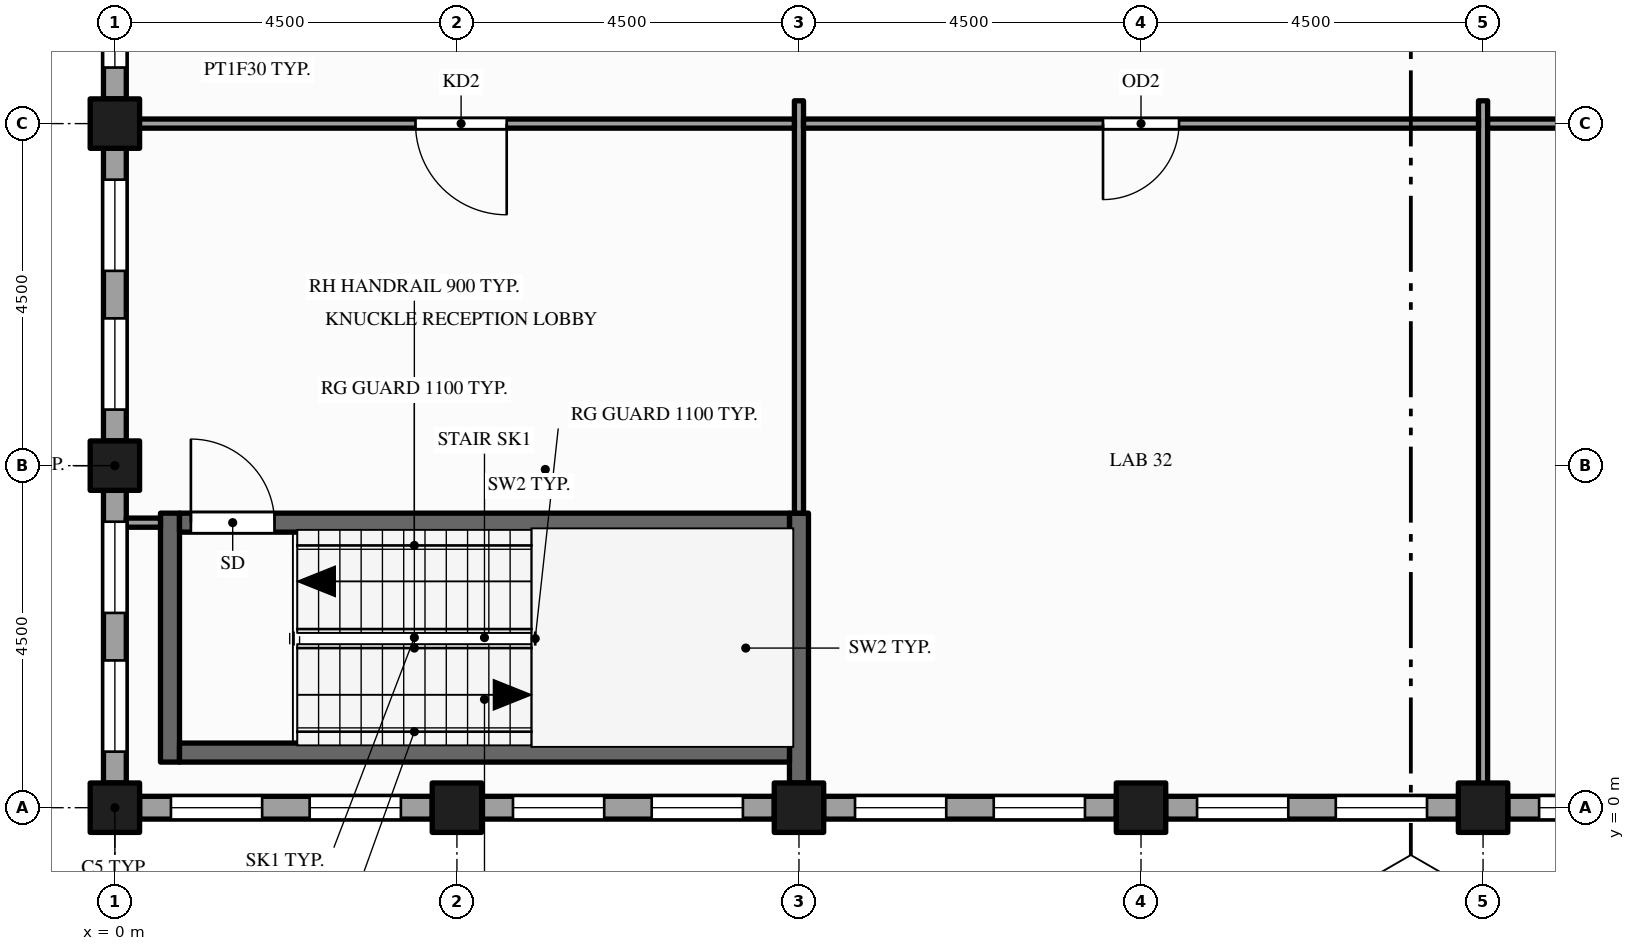
"""IFC4 building model, lengths in metres.
Left out: names, types, materials, properties, quantities, classifications, styles, units other than length and angle.
Written with IfcOpenShell. Run it as: python <this file> out.ifc"""

import sys

from ifc_helpers import new_model, si_unit, direction, frame, frame_2d, origin, origin_2d, place, context, subcontext, project, spatial, rectangle, hollow_rectangle, extrude, element, fill, save


model = new_model("IFC4")
c1 = context("Model", 3, precision=1e-05, world=origin(), true_north=direction((0.0, 1.0)))
c2 = subcontext(c1, "Body", "Model", "MODEL_VIEW")
j1 = project(units=[si_unit("LENGTHUNIT", "METRE"), si_unit("PLANEANGLEUNIT", "RADIAN")], contexts=[c1])
p1 = place(None, origin())
s1 = spatial("IfcSite", under=j1, at=p1, CompositionType="ELEMENT")
p2 = place(p1, origin())
s2 = spatial("IfcBuilding", under=s1, at=p2, CompositionType="ELEMENT")
p3 = place(p2, frame((0.0, 0.0, 249.0)))
s3 = spatial("IfcBuildingStorey", under=s2, at=p3, CompositionType="ELEMENT", Elevation=249.0)
for number, where, z_axis, x_axis in (
    (1, (0.0, 0.0, -0.15), (0.0, 0.0, 1.0), (1.0, 0.0, 0.0)),
    (2, (0.0, 4.5, -0.15), (0.0, 0.0, 1.0), (1.0, 0.0, 0.0)),
    (3, (0.0, 9.0, -0.15), (0.0, 0.0, 1.0), (1.0, 0.0, 0.0)),
    (4, (4.5, 0.0, -0.15), (0.0, 0.0, 1.0), (1.0, 0.0, 0.0)),
    (5, (9.0, 0.0, -0.15), (0.0, 0.0, 1.0), (1.0, 0.0, 0.0)),
    (6, (13.5, 0.0, -0.15), (0.0, 0.0, 1.0), (1.0, 0.0, 0.0)),
    (7, (18.0, 0.0, -0.15), (0.0, 0.0, 1.0), (1.0, 0.0, 0.0)),
):
    element("IfcColumn", number, at=place(p3, frame(where, z_axis=z_axis, x_axis=x_axis)), inside=s3, PredefinedType="COLUMN", context=c2, shape_type="SweptSolid", body=[
        extrude(hollow_rectangle(XDim=0.65, YDim=0.65, WallThickness=0.032, at=origin_2d()), origin(), (0.0, 0.0, 1.0), 4.0),
    ])
p4 = place(p3, frame((0.0, 13.175, 0.0), z_axis=(0.0, 0.0, 1.0), x_axis=(0.0, -1.0, 0.0)))
e8 = element("IfcWall", 8, at=p4, inside=s3, PredefinedType="STANDARD", context=c2, shape_type="SweptSolid", body=[
    extrude(rectangle(XDim=3.85, YDim=0.3, at=frame_2d((1.925, 0.0))), origin(), (0.0, 0.0, 1.0), 3.162),
])
p5 = place(p4, frame((0.413, 0.0, 0.9)))
e9 = element("IfcOpeningElement", 9, at=p5, cuts=e8, PredefinedType="OPENING", context=c2, shape_type="SweptSolid", body=[
    extrude(rectangle(XDim=1.2, YDim=2.0, at=frame_2d((0.6, 1.0))), frame((0.0, 0.16, 0.0), z_axis=(0.0, -1.0, 0.0), x_axis=(1.0, 0.0, 0.0)), (0.0, 0.0, 1.0), 0.32),
])
p6 = place(p4, frame((2.238, 0.0, 0.9)))
e10 = element("IfcOpeningElement", 10, at=p6, cuts=e8, PredefinedType="OPENING", context=c2, shape_type="SweptSolid", body=[
    extrude(rectangle(XDim=1.2, YDim=2.0, at=frame_2d((0.6, 1.0))), frame((0.0, 0.16, 0.0), z_axis=(0.0, -1.0, 0.0), x_axis=(1.0, 0.0, 0.0)), (0.0, 0.0, 1.0), 0.32),
])
p7 = place(p3, frame((0.0, 8.675, 0.0), z_axis=(0.0, 0.0, 1.0), x_axis=(0.0, -1.0, 0.0)))
e11 = element("IfcWall", 11, at=p7, inside=s3, PredefinedType="STANDARD", context=c2, shape_type="SweptSolid", body=[
    extrude(rectangle(XDim=3.85, YDim=0.3, at=frame_2d((1.925, 0.0))), origin(), (0.0, 0.0, 1.0), 3.162),
])
p8 = place(p7, frame((0.413, 0.0, 0.9)))
e12 = element("IfcOpeningElement", 12, at=p8, cuts=e11, PredefinedType="OPENING", context=c2, shape_type="SweptSolid", body=[
    extrude(rectangle(XDim=1.2, YDim=2.0, at=frame_2d((0.6, 1.0))), frame((0.0, 0.16, 0.0), z_axis=(0.0, -1.0, 0.0), x_axis=(1.0, 0.0, 0.0)), (0.0, 0.0, 1.0), 0.32),
])
p9 = place(p7, frame((2.238, 0.0, 0.9)))
e13 = element("IfcOpeningElement", 13, at=p9, cuts=e11, PredefinedType="OPENING", context=c2, shape_type="SweptSolid", body=[
    extrude(rectangle(XDim=1.2, YDim=2.0, at=frame_2d((0.6, 1.0))), frame((0.0, 0.16, 0.0), z_axis=(0.0, -1.0, 0.0), x_axis=(1.0, 0.0, 0.0)), (0.0, 0.0, 1.0), 0.32),
])
p10 = place(p3, frame((0.0, 4.175, 0.0), z_axis=(0.0, 0.0, 1.0), x_axis=(0.0, -1.0, 0.0)))
e14 = element("IfcWall", 14, at=p10, inside=s3, PredefinedType="STANDARD", context=c2, shape_type="SweptSolid", body=[
    extrude(rectangle(XDim=3.85, YDim=0.3, at=frame_2d((1.925, 0.0))), origin(), (0.0, 0.0, 1.0), 3.162),
])
p11 = place(p10, frame((0.413, 0.0, 0.9)))
e15 = element("IfcOpeningElement", 15, at=p11, cuts=e14, PredefinedType="OPENING", context=c2, shape_type="SweptSolid", body=[
    extrude(rectangle(XDim=1.2, YDim=2.0, at=frame_2d((0.6, 1.0))), frame((0.0, 0.16, 0.0), z_axis=(0.0, -1.0, 0.0), x_axis=(1.0, 0.0, 0.0)), (0.0, 0.0, 1.0), 0.32),
])
p12 = place(p10, frame((2.238, 0.0, 0.9)))
e16 = element("IfcOpeningElement", 16, at=p12, cuts=e14, PredefinedType="OPENING", context=c2, shape_type="SweptSolid", body=[
    extrude(rectangle(XDim=1.2, YDim=2.0, at=frame_2d((0.6, 1.0))), frame((0.0, 0.16, 0.0), z_axis=(0.0, -1.0, 0.0), x_axis=(1.0, 0.0, 0.0)), (0.0, 0.0, 1.0), 0.32),
])
p13 = place(p3, frame((0.325, 0.0, 0.0), z_axis=(0.0, 0.0, 1.0), x_axis=(1.0, 0.0, 0.0)))
e17 = element("IfcWall", 17, at=p13, inside=s3, PredefinedType="STANDARD", context=c2, shape_type="SweptSolid", body=[
    extrude(rectangle(XDim=3.85, YDim=0.3, at=frame_2d((1.925, 0.0))), origin(), (0.0, 0.0, 1.0), 3.162),
])
p14 = place(p13, frame((0.413, 0.0, 0.9)))
e18 = element("IfcOpeningElement", 18, at=p14, cuts=e17, PredefinedType="OPENING", context=c2, shape_type="SweptSolid", body=[
    extrude(rectangle(XDim=1.2, YDim=2.0, at=frame_2d((0.6, 1.0))), frame((0.0, 0.16, 0.0), z_axis=(0.0, -1.0, 0.0), x_axis=(1.0, 0.0, 0.0)), (0.0, 0.0, 1.0), 0.32),
])
p15 = place(p13, frame((2.238, 0.0, 0.9)))
e19 = element("IfcOpeningElement", 19, at=p15, cuts=e17, PredefinedType="OPENING", context=c2, shape_type="SweptSolid", body=[
    extrude(rectangle(XDim=1.2, YDim=2.0, at=frame_2d((0.6, 1.0))), frame((0.0, 0.16, 0.0), z_axis=(0.0, -1.0, 0.0), x_axis=(1.0, 0.0, 0.0)), (0.0, 0.0, 1.0), 0.32),
])
p16 = place(p3, frame((4.825, 0.0, 0.0), z_axis=(0.0, 0.0, 1.0), x_axis=(1.0, 0.0, 0.0)))
e20 = element("IfcWall", 20, at=p16, inside=s3, PredefinedType="STANDARD", context=c2, shape_type="SweptSolid", body=[
    extrude(rectangle(XDim=3.85, YDim=0.3, at=frame_2d((1.925, 0.0))), origin(), (0.0, 0.0, 1.0), 3.162),
])
p17 = place(p16, frame((0.413, 0.0, 0.9)))
e21 = element("IfcOpeningElement", 21, at=p17, cuts=e20, PredefinedType="OPENING", context=c2, shape_type="SweptSolid", body=[
    extrude(rectangle(XDim=1.2, YDim=2.0, at=frame_2d((0.6, 1.0))), frame((0.0, 0.16, 0.0), z_axis=(0.0, -1.0, 0.0), x_axis=(1.0, 0.0, 0.0)), (0.0, 0.0, 1.0), 0.32),
])
p18 = place(p16, frame((2.238, 0.0, 0.9)))
e22 = element("IfcOpeningElement", 22, at=p18, cuts=e20, PredefinedType="OPENING", context=c2, shape_type="SweptSolid", body=[
    extrude(rectangle(XDim=1.2, YDim=2.0, at=frame_2d((0.6, 1.0))), frame((0.0, 0.16, 0.0), z_axis=(0.0, -1.0, 0.0), x_axis=(1.0, 0.0, 0.0)), (0.0, 0.0, 1.0), 0.32),
])
p19 = place(p3, frame((9.325, 0.0, 0.0), z_axis=(0.0, 0.0, 1.0), x_axis=(1.0, 0.0, 0.0)))
e23 = element("IfcWall", 23, at=p19, inside=s3, PredefinedType="STANDARD", context=c2, shape_type="SweptSolid", body=[
    extrude(rectangle(XDim=3.85, YDim=0.3, at=frame_2d((1.925, 0.0))), origin(), (0.0, 0.0, 1.0), 2.87),
])
p20 = place(p19, frame((0.413, 0.0, 0.9)))
e24 = element("IfcOpeningElement", 24, at=p20, cuts=e23, PredefinedType="OPENING", context=c2, shape_type="SweptSolid", body=[
    extrude(rectangle(XDim=1.2, YDim=1.75, at=frame_2d((0.6, 0.875))), frame((0.0, 0.16, 0.0), z_axis=(0.0, -1.0, 0.0), x_axis=(1.0, 0.0, 0.0)), (0.0, 0.0, 1.0), 0.32),
])
p21 = place(p19, frame((2.238, 0.0, 0.9)))
e25 = element("IfcOpeningElement", 25, at=p21, cuts=e23, PredefinedType="OPENING", context=c2, shape_type="SweptSolid", body=[
    extrude(rectangle(XDim=1.2, YDim=1.75, at=frame_2d((0.6, 0.875))), frame((0.0, 0.16, 0.0), z_axis=(0.0, -1.0, 0.0), x_axis=(1.0, 0.0, 0.0)), (0.0, 0.0, 1.0), 0.32),
])
p22 = place(p3, frame((13.825, 0.0, 0.0), z_axis=(0.0, 0.0, 1.0), x_axis=(1.0, 0.0, 0.0)))
e26 = element("IfcWall", 26, at=p22, inside=s3, PredefinedType="STANDARD", context=c2, shape_type="SweptSolid", body=[
    extrude(rectangle(XDim=3.85, YDim=0.3, at=frame_2d((1.925, 0.0))), origin(), (0.0, 0.0, 1.0), 2.87),
])
p23 = place(p22, frame((0.413, 0.0, 0.9)))
e27 = element("IfcOpeningElement", 27, at=p23, cuts=e26, PredefinedType="OPENING", context=c2, shape_type="SweptSolid", body=[
    extrude(rectangle(XDim=1.2, YDim=1.75, at=frame_2d((0.6, 0.875))), frame((0.0, 0.16, 0.0), z_axis=(0.0, -1.0, 0.0), x_axis=(1.0, 0.0, 0.0)), (0.0, 0.0, 1.0), 0.32),
])
p24 = place(p22, frame((2.238, 0.0, 0.9)))
e28 = element("IfcOpeningElement", 28, at=p24, cuts=e26, PredefinedType="OPENING", context=c2, shape_type="SweptSolid", body=[
    extrude(rectangle(XDim=1.2, YDim=1.75, at=frame_2d((0.6, 0.875))), frame((0.0, 0.16, 0.0), z_axis=(0.0, -1.0, 0.0), x_axis=(1.0, 0.0, 0.0)), (0.0, 0.0, 1.0), 0.32),
])
p25 = place(p3, frame((18.325, 0.0, 0.0), z_axis=(0.0, 0.0, 1.0), x_axis=(1.0, 0.0, 0.0)))
e29 = element("IfcWall", 29, at=p25, inside=s3, PredefinedType="STANDARD", context=c2, shape_type="SweptSolid", body=[
    extrude(rectangle(XDim=3.85, YDim=0.3, at=frame_2d((1.925, 0.0))), origin(), (0.0, 0.0, 1.0), 2.87),
])
p26 = place(p25, frame((0.413, 0.0, 0.9)))
e30 = element("IfcOpeningElement", 30, at=p26, cuts=e29, PredefinedType="OPENING", context=c2, shape_type="SweptSolid", body=[
    extrude(rectangle(XDim=1.2, YDim=1.75, at=frame_2d((0.6, 0.875))), frame((0.0, 0.16, 0.0), z_axis=(0.0, -1.0, 0.0), x_axis=(1.0, 0.0, 0.0)), (0.0, 0.0, 1.0), 0.32),
])
p27 = place(p25, frame((2.238, 0.0, 0.9)))
e31 = element("IfcOpeningElement", 31, at=p27, cuts=e29, PredefinedType="OPENING", context=c2, shape_type="SweptSolid", body=[
    extrude(rectangle(XDim=1.2, YDim=1.75, at=frame_2d((0.6, 0.875))), frame((0.0, 0.16, 0.0), z_axis=(0.0, -1.0, 0.0), x_axis=(1.0, 0.0, 0.0)), (0.0, 0.0, 1.0), 0.32),
])
p28 = place(p3, frame((0.725, 0.6, 0.0), z_axis=(0.0, 0.0, 1.0), x_axis=(0.0, 1.0, 0.0)))
e32 = element("IfcWall", 32, at=p28, inside=s3, PredefinedType="SHEAR", context=c2, shape_type="SweptSolid", body=[
    extrude(rectangle(XDim=3.275, YDim=0.25, at=frame_2d((1.637, 0.0))), origin(), (0.0, 0.0, 1.0), 3.85),
])
p29 = place(p3, frame((9.0, 0.325, 0.0), z_axis=(0.0, 0.0, 1.0), x_axis=(0.0, 1.0, 0.0)))
e33 = element("IfcWall", 33, at=p29, inside=s3, PredefinedType="SHEAR", context=c2, shape_type="SweptSolid", body=[
    extrude(rectangle(XDim=3.55, YDim=0.25, at=frame_2d((1.775, 0.0))), origin(), (0.0, 0.0, 1.0), 3.85),
])
p30 = place(p3, frame((9.0, 3.875, 0.0), z_axis=(0.0, 0.0, 1.0), x_axis=(0.0, 1.0, 0.0)))
e34 = element("IfcWall", 34, at=p30, inside=s3, PredefinedType="PARTITIONING", context=c2, shape_type="SweptSolid", body=[
    extrude(rectangle(XDim=5.425, YDim=0.12, at=frame_2d((2.712, 0.0))), origin(), (0.0, 0.0, 1.0), 2.87),
])
p31 = place(p3, frame((18.0, 0.15, 0.0), z_axis=(0.0, 0.0, 1.0), x_axis=(0.0, 1.0, 0.0)))
e35 = element("IfcWall", 35, at=p31, inside=s3, PredefinedType="PARTITIONING", context=c2, shape_type="SweptSolid", body=[
    extrude(rectangle(XDim=9.15, YDim=0.12, at=frame_2d((4.575, 0.0))), origin(), (0.0, 0.0, 1.0), 2.87),
])
p32 = place(p3, frame((0.85, 0.725, 0.0), z_axis=(0.0, 0.0, 1.0), x_axis=(1.0, 0.0, 0.0)))
e36 = element("IfcWall", 36, at=p32, inside=s3, PredefinedType="SHEAR", context=c2, shape_type="SweptSolid", body=[
    extrude(rectangle(XDim=8.025, YDim=0.25, at=frame_2d((4.012, 0.0))), origin(), (0.0, 0.0, 1.0), 3.85),
])
p33 = place(p3, frame((0.15, 3.75, 0.0), z_axis=(0.0, 0.0, 1.0), x_axis=(1.0, 0.0, 0.0)))
e37 = element("IfcWall", 37, at=p33, inside=s3, PredefinedType="PARTITIONING", context=c2, shape_type="SweptSolid", body=[
    extrude(rectangle(XDim=0.45, YDim=0.12, at=frame_2d((0.225, 0.0))), origin(), (0.0, 0.0, 1.0), 3.85),
])
p34 = place(p3, frame((0.85, 3.75, 0.0), z_axis=(0.0, 0.0, 1.0), x_axis=(1.0, 0.0, 0.0)))
e38 = element("IfcWall", 38, at=p34, inside=s3, PredefinedType="SHEAR", context=c2, shape_type="SweptSolid", body=[
    extrude(rectangle(XDim=8.025, YDim=0.25, at=frame_2d((4.012, 0.0))), origin(), (0.0, 0.0, 1.0), 3.85),
])
p35 = place(p34, frame((0.15, 0.0, 0.0)))
e39 = element("IfcOpeningElement", 39, at=p35, cuts=e38, PredefinedType="OPENING", context=c2, shape_type="SweptSolid", body=[
    extrude(rectangle(XDim=1.1, YDim=2.1, at=frame_2d((0.55, 1.05))), frame((0.0, 0.135, 0.0), z_axis=(0.0, -1.0, 0.0), x_axis=(1.0, 0.0, 0.0)), (0.0, 0.0, 1.0), 0.27),
])
p36 = place(p3, frame((0.15, 9.0, 0.0), z_axis=(0.0, 0.0, 1.0), x_axis=(1.0, 0.0, 0.0)))
e40 = element("IfcWall", 40, at=p36, inside=s3, PredefinedType="PARTITIONING", context=c2, shape_type="SweptSolid", body=[
    extrude(rectangle(XDim=8.79, YDim=0.12, at=frame_2d((4.395, 0.0))), origin(), (0.0, 0.0, 1.0), 2.87),
])
p37 = place(p36, frame((3.805, 0.0, 0.0)))
e41 = element("IfcOpeningElement", 41, at=p37, cuts=e40, PredefinedType="OPENING", context=c2, shape_type="SweptSolid", body=[
    extrude(rectangle(XDim=1.2, YDim=2.1, at=frame_2d((0.6, 1.05))), frame((0.0, 0.07, 0.0), z_axis=(0.0, -1.0, 0.0), x_axis=(1.0, 0.0, 0.0)), (0.0, 0.0, 1.0), 0.14),
])
p38 = place(p3, frame((9.06, 9.0, 0.0), z_axis=(0.0, 0.0, 1.0), x_axis=(1.0, 0.0, 0.0)))
e42 = element("IfcWall", 42, at=p38, inside=s3, PredefinedType="PARTITIONING", context=c2, shape_type="SweptSolid", body=[
    extrude(rectangle(XDim=8.88, YDim=0.12, at=frame_2d((4.44, 0.0))), origin(), (0.0, 0.0, 1.0), 2.87),
])
p39 = place(p38, frame((3.94, 0.0, 0.0)))
e43 = element("IfcOpeningElement", 43, at=p39, cuts=e42, PredefinedType="OPENING", context=c2, shape_type="SweptSolid", body=[
    extrude(rectangle(XDim=1.0, YDim=2.1, at=frame_2d((0.5, 1.05))), frame((0.0, 0.07, 0.0), z_axis=(0.0, -1.0, 0.0), x_axis=(1.0, 0.0, 0.0)), (0.0, 0.0, 1.0), 0.14),
])
p40 = place(p3, frame((18.06, 9.0, 0.0), z_axis=(0.0, 0.0, 1.0), x_axis=(1.0, 0.0, 0.0)))
e44 = element("IfcWall", 44, at=p40, inside=s3, PredefinedType="PARTITIONING", context=c2, shape_type="SweptSolid", body=[
    extrude(rectangle(XDim=8.88, YDim=0.12, at=frame_2d((4.44, 0.0))), origin(), (0.0, 0.0, 1.0), 2.87),
])
p41 = place(p40, frame((3.94, 0.0, 0.0)))
e45 = element("IfcOpeningElement", 45, at=p41, cuts=e44, PredefinedType="OPENING", context=c2, shape_type="SweptSolid", body=[
    extrude(rectangle(XDim=1.0, YDim=2.1, at=frame_2d((0.5, 1.05))), frame((0.0, 0.07, 0.0), z_axis=(0.0, -1.0, 0.0), x_axis=(1.0, 0.0, 0.0)), (0.0, 0.0, 1.0), 0.14),
])
p42 = place(p6, origin())
e46 = element("IfcWindow", 46, at=p42, inside=s3, PartitioningType="SINGLE_PANEL", PredefinedType="WINDOW", context=c2, shape_type="SweptSolid", body=[
    extrude(rectangle(XDim=1.2, YDim=2.0, at=frame_2d((0.6, 1.0))), frame((0.0, 0.03, 0.0), z_axis=(0.0, -1.0, 0.0), x_axis=(1.0, 0.0, 0.0)), (0.0, 0.0, 1.0), 0.06),
])
fill(e10, e46)
p43 = place(p8, origin())
e47 = element("IfcWindow", 47, at=p43, inside=s3, PartitioningType="SINGLE_PANEL", PredefinedType="WINDOW", context=c2, shape_type="SweptSolid", body=[
    extrude(rectangle(XDim=1.2, YDim=2.0, at=frame_2d((0.6, 1.0))), frame((0.0, 0.03, 0.0), z_axis=(0.0, -1.0, 0.0), x_axis=(1.0, 0.0, 0.0)), (0.0, 0.0, 1.0), 0.06),
])
fill(e12, e47)
p44 = place(p9, origin())
e48 = element("IfcWindow", 48, at=p44, inside=s3, PartitioningType="SINGLE_PANEL", PredefinedType="WINDOW", context=c2, shape_type="SweptSolid", body=[
    extrude(rectangle(XDim=1.2, YDim=2.0, at=frame_2d((0.6, 1.0))), frame((0.0, 0.03, 0.0), z_axis=(0.0, -1.0, 0.0), x_axis=(1.0, 0.0, 0.0)), (0.0, 0.0, 1.0), 0.06),
])
fill(e13, e48)
p45 = place(p11, origin())
e49 = element("IfcWindow", 49, at=p45, inside=s3, PartitioningType="SINGLE_PANEL", PredefinedType="WINDOW", context=c2, shape_type="SweptSolid", body=[
    extrude(rectangle(XDim=1.2, YDim=2.0, at=frame_2d((0.6, 1.0))), frame((0.0, 0.03, 0.0), z_axis=(0.0, -1.0, 0.0), x_axis=(1.0, 0.0, 0.0)), (0.0, 0.0, 1.0), 0.06),
])
fill(e15, e49)
p46 = place(p12, origin())
e50 = element("IfcWindow", 50, at=p46, inside=s3, PartitioningType="SINGLE_PANEL", PredefinedType="WINDOW", context=c2, shape_type="SweptSolid", body=[
    extrude(rectangle(XDim=1.2, YDim=2.0, at=frame_2d((0.6, 1.0))), frame((0.0, 0.03, 0.0), z_axis=(0.0, -1.0, 0.0), x_axis=(1.0, 0.0, 0.0)), (0.0, 0.0, 1.0), 0.06),
])
fill(e16, e50)
p47 = place(p14, origin())
e51 = element("IfcWindow", 51, at=p47, inside=s3, PartitioningType="SINGLE_PANEL", PredefinedType="WINDOW", context=c2, shape_type="SweptSolid", body=[
    extrude(rectangle(XDim=1.2, YDim=2.0, at=frame_2d((0.6, 1.0))), frame((0.0, 0.03, 0.0), z_axis=(0.0, -1.0, 0.0), x_axis=(1.0, 0.0, 0.0)), (0.0, 0.0, 1.0), 0.06),
])
fill(e18, e51)
p48 = place(p15, origin())
e52 = element("IfcWindow", 52, at=p48, inside=s3, PartitioningType="SINGLE_PANEL", PredefinedType="WINDOW", context=c2, shape_type="SweptSolid", body=[
    extrude(rectangle(XDim=1.2, YDim=2.0, at=frame_2d((0.6, 1.0))), frame((0.0, 0.03, 0.0), z_axis=(0.0, -1.0, 0.0), x_axis=(1.0, 0.0, 0.0)), (0.0, 0.0, 1.0), 0.06),
])
fill(e19, e52)
p49 = place(p17, origin())
e53 = element("IfcWindow", 53, at=p49, inside=s3, PartitioningType="SINGLE_PANEL", PredefinedType="WINDOW", context=c2, shape_type="SweptSolid", body=[
    extrude(rectangle(XDim=1.2, YDim=2.0, at=frame_2d((0.6, 1.0))), frame((0.0, 0.03, 0.0), z_axis=(0.0, -1.0, 0.0), x_axis=(1.0, 0.0, 0.0)), (0.0, 0.0, 1.0), 0.06),
])
fill(e21, e53)
p50 = place(p18, origin())
e54 = element("IfcWindow", 54, at=p50, inside=s3, PartitioningType="SINGLE_PANEL", PredefinedType="WINDOW", context=c2, shape_type="SweptSolid", body=[
    extrude(rectangle(XDim=1.2, YDim=2.0, at=frame_2d((0.6, 1.0))), frame((0.0, 0.03, 0.0), z_axis=(0.0, -1.0, 0.0), x_axis=(1.0, 0.0, 0.0)), (0.0, 0.0, 1.0), 0.06),
])
fill(e22, e54)
p51 = place(p20, origin())
e55 = element("IfcWindow", 55, at=p51, inside=s3, PartitioningType="SINGLE_PANEL", PredefinedType="WINDOW", context=c2, shape_type="SweptSolid", body=[
    extrude(rectangle(XDim=1.2, YDim=1.75, at=frame_2d((0.6, 0.875))), frame((0.0, 0.03, 0.0), z_axis=(0.0, -1.0, 0.0), x_axis=(1.0, 0.0, 0.0)), (0.0, 0.0, 1.0), 0.06),
])
fill(e24, e55)
p52 = place(p21, origin())
e56 = element("IfcWindow", 56, at=p52, inside=s3, PartitioningType="SINGLE_PANEL", PredefinedType="WINDOW", context=c2, shape_type="SweptSolid", body=[
    extrude(rectangle(XDim=1.2, YDim=1.75, at=frame_2d((0.6, 0.875))), frame((0.0, 0.03, 0.0), z_axis=(0.0, -1.0, 0.0), x_axis=(1.0, 0.0, 0.0)), (0.0, 0.0, 1.0), 0.06),
])
fill(e25, e56)
p53 = place(p23, origin())
e57 = element("IfcWindow", 57, at=p53, inside=s3, PartitioningType="SINGLE_PANEL", PredefinedType="WINDOW", context=c2, shape_type="SweptSolid", body=[
    extrude(rectangle(XDim=1.2, YDim=1.75, at=frame_2d((0.6, 0.875))), frame((0.0, 0.03, 0.0), z_axis=(0.0, -1.0, 0.0), x_axis=(1.0, 0.0, 0.0)), (0.0, 0.0, 1.0), 0.06),
])
fill(e27, e57)
p54 = place(p24, origin())
e58 = element("IfcWindow", 58, at=p54, inside=s3, PartitioningType="SINGLE_PANEL", PredefinedType="WINDOW", context=c2, shape_type="SweptSolid", body=[
    extrude(rectangle(XDim=1.2, YDim=1.75, at=frame_2d((0.6, 0.875))), frame((0.0, 0.03, 0.0), z_axis=(0.0, -1.0, 0.0), x_axis=(1.0, 0.0, 0.0)), (0.0, 0.0, 1.0), 0.06),
])
fill(e28, e58)
p55 = place(p26, origin())
e59 = element("IfcWindow", 59, at=p55, inside=s3, PartitioningType="SINGLE_PANEL", PredefinedType="WINDOW", context=c2, shape_type="SweptSolid", body=[
    extrude(rectangle(XDim=1.2, YDim=1.75, at=frame_2d((0.6, 0.875))), frame((0.0, 0.03, 0.0), z_axis=(0.0, -1.0, 0.0), x_axis=(1.0, 0.0, 0.0)), (0.0, 0.0, 1.0), 0.06),
])
fill(e30, e59)
p56 = place(p35, origin())
e60 = element("IfcDoor", 60, at=p56, inside=s3, OperationType="SINGLE_SWING_LEFT", PredefinedType="DOOR", context=c2, shape_type="SweptSolid", body=[
    extrude(rectangle(XDim=1.1, YDim=2.1, at=frame_2d((0.55, 1.05))), frame((0.0, 0.025, 0.0), z_axis=(0.0, -1.0, 0.0), x_axis=(1.0, 0.0, 0.0)), (0.0, 0.0, 1.0), 0.05),
])
fill(e39, e60)
p57 = place(p37, origin())
e61 = element("IfcDoor", 61, at=p57, inside=s3, OperationType="SINGLE_SWING_RIGHT", PredefinedType="DOOR", context=c2, shape_type="SweptSolid", body=[
    extrude(rectangle(XDim=1.2, YDim=2.1, at=frame_2d((0.6, 1.05))), frame((0.0, 0.025, 0.0), z_axis=(0.0, -1.0, 0.0), x_axis=(1.0, 0.0, 0.0)), (0.0, 0.0, 1.0), 0.05),
])
fill(e41, e61)
p58 = place(p39, origin())
e62 = element("IfcDoor", 62, at=p58, inside=s3, OperationType="SINGLE_SWING_LEFT", PredefinedType="DOOR", context=c2, shape_type="SweptSolid", body=[
    extrude(rectangle(XDim=1.0, YDim=2.1, at=frame_2d((0.5, 1.05))), frame((0.0, 0.025, 0.0), z_axis=(0.0, -1.0, 0.0), x_axis=(1.0, 0.0, 0.0)), (0.0, 0.0, 1.0), 0.05),
])
fill(e43, e62)
save(model, sys.argv[1])
